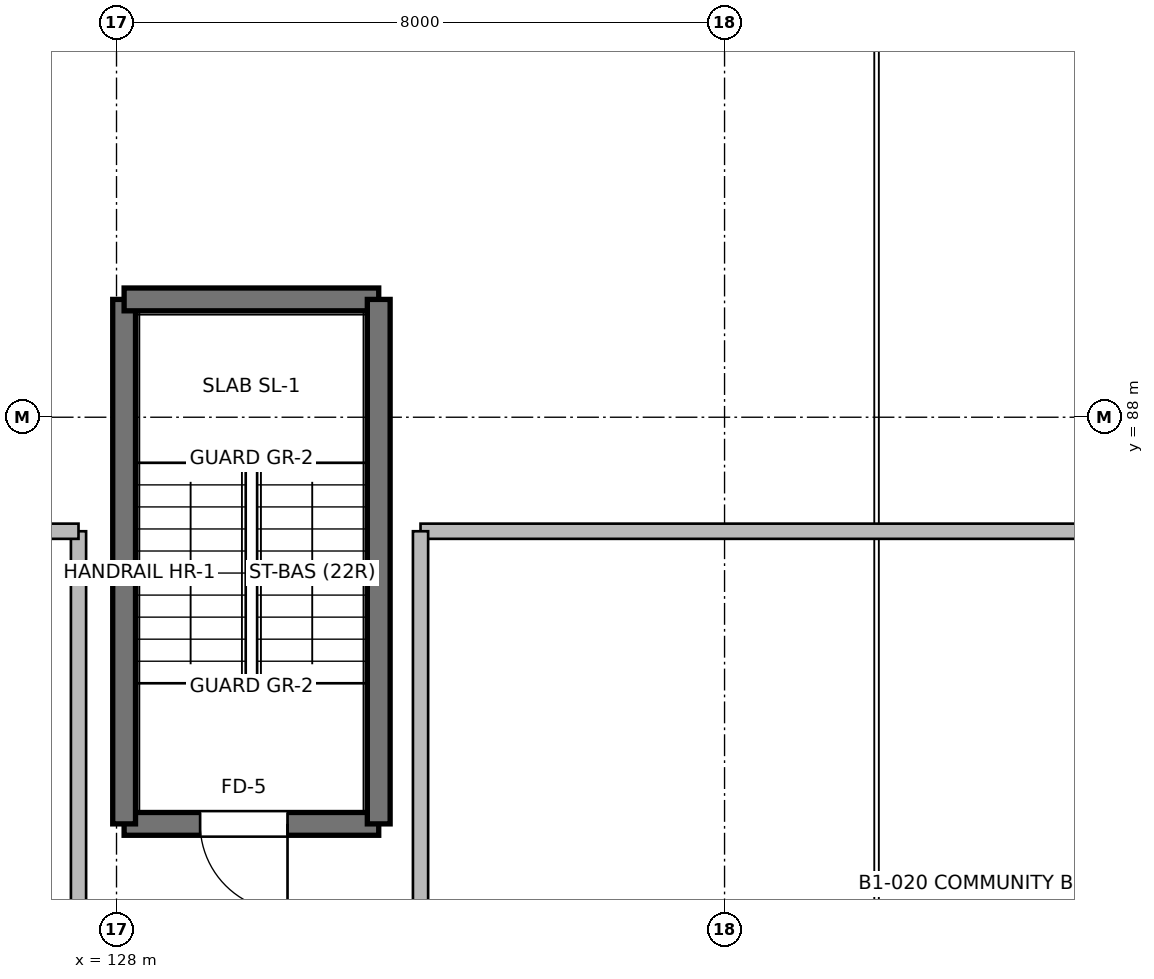
"""IFC4 building model, lengths in metres.
Left out: names, types, materials, properties, quantities, classifications, styles, units other than length and angle.
Written with IfcOpenShell. Run it as: python <this file> out.ifc"""

import sys

from ifc_helpers import new_model, si_unit, direction, frame, frame_2d, origin, place, context, subcontext, project, spatial, rectangle, extrude, element, fill, save


model = new_model("IFC4")
c1 = context("Model", 3, precision=1e-05, world=origin(), true_north=direction((0.0, 1.0)))
c2 = subcontext(c1, "Body", "Model", "MODEL_VIEW")
j1 = project(units=[si_unit("LENGTHUNIT", "METRE"), si_unit("PLANEANGLEUNIT", "RADIAN")], contexts=[c1])
p1 = place(None, origin())
s1 = spatial("IfcSite", under=j1, at=p1, CompositionType="ELEMENT")
p2 = place(p1, origin())
s2 = spatial("IfcBuilding", under=s1, at=p2, CompositionType="ELEMENT")
p3 = place(p2, frame((0.0, 0.0, -3.84)))
s3 = spatial("IfcBuildingStorey", under=s2, at=p3, CompositionType="ELEMENT", Elevation=-3.84)
p4 = place(p3, frame((131.45, 82.65, 0.0), z_axis=(0.0, 0.0, 1.0), x_axis=(-1.0, 0.0, 0.0)))
e1 = element("IfcWall", 1, at=p4, inside=s3, PredefinedType="SHEAR", context=c2, shape_type="SweptSolid", body=[
    extrude(rectangle(XDim=3.35, YDim=0.3, at=frame_2d((1.675, 0.0))), origin(), (0.0, 0.0, 1.0), 3.52),
])
p5 = place(p4, frame((1.2, 0.0, 0.0)))
e2 = element("IfcOpeningElement", 2, at=p5, cuts=e1, PredefinedType="OPENING", context=c2, shape_type="SweptSolid", body=[
    extrude(rectangle(XDim=1.15, YDim=2.2, at=frame_2d((0.575, 1.1))), frame((0.0, 0.16, 0.0), z_axis=(0.0, -1.0, 0.0), x_axis=(1.0, 0.0, 0.0)), (0.0, 0.0, 1.0), 0.32),
])
p6 = place(p3, frame((128.1, 82.65, 0.0), z_axis=(0.0, 0.0, 1.0), x_axis=(0.0, 1.0, 0.0)))
e3 = element("IfcWall", 3, at=p6, inside=s3, PredefinedType="SHEAR", context=c2, shape_type="SweptSolid", body=[
    extrude(rectangle(XDim=6.9, YDim=0.3, at=frame_2d((3.45, 0.0))), origin(), (0.0, 0.0, 1.0), 3.52),
])
p7 = place(p3, frame((128.1, 89.55, 0.0), z_axis=(0.0, 0.0, 1.0), x_axis=(1.0, 0.0, 0.0)))
e4 = element("IfcWall", 4, at=p7, inside=s3, PredefinedType="SHEAR", context=c2, shape_type="SweptSolid", body=[
    extrude(rectangle(XDim=3.35, YDim=0.3, at=frame_2d((1.675, 0.0))), origin(), (0.0, 0.0, 1.0), 3.52),
])
p8 = place(p3, frame((131.45, 89.55, 0.0), z_axis=(0.0, 0.0, 1.0), x_axis=(0.0, -1.0, 0.0)))
e5 = element("IfcWall", 5, at=p8, inside=s3, PredefinedType="SHEAR", context=c2, shape_type="SweptSolid", body=[
    extrude(rectangle(XDim=6.9, YDim=0.3, at=frame_2d((3.45, 0.0))), origin(), (0.0, 0.0, 1.0), 3.52),
])
p9 = place(p3, frame((127.5, 77.2, 0.0), z_axis=(0.0, 0.0, 1.0), x_axis=(0.0, 1.0, 0.0)))
e6 = element("IfcWall", 6, at=p9, inside=s3, PredefinedType="SOLIDWALL", context=c2, shape_type="SweptSolid", body=[
    extrude(rectangle(XDim=9.3, YDim=0.2, at=frame_2d((4.65, 0.0))), origin(), (0.0, 0.0, 1.0), 3.52),
])
p10 = place(p3, frame((127.5, 86.5, 0.0), z_axis=(0.0, 0.0, 1.0), x_axis=(-1.0, 0.0, 0.0)))
e7 = element("IfcWall", 7, at=p10, inside=s3, PredefinedType="SOLIDWALL", context=c2, shape_type="SweptSolid", body=[
    extrude(rectangle(XDim=16.2, YDim=0.2, at=frame_2d((8.1, 0.0))), origin(), (0.0, 0.0, 1.0), 3.52),
])
p11 = place(p10, frame((8.8, 0.0, 0.0)))
e8 = element("IfcOpeningElement", 8, at=p11, cuts=e7, PredefinedType="OPENING", context=c2, shape_type="SweptSolid", body=[
    extrude(rectangle(XDim=1.0, YDim=2.1, at=frame_2d((0.5, 1.05))), frame((0.0, 0.11, 0.0), z_axis=(0.0, -1.0, 0.0), x_axis=(1.0, 0.0, 0.0)), (0.0, 0.0, 1.0), 0.22),
])
p12 = place(p3, frame((151.5, 86.5, 0.0), z_axis=(0.0, 0.0, 1.0), x_axis=(-1.0, 0.0, 0.0)))
e9 = element("IfcWall", 9, at=p12, inside=s3, PredefinedType="SOLIDWALL", context=c2, shape_type="SweptSolid", body=[
    extrude(rectangle(XDim=19.5, YDim=0.2, at=frame_2d((9.75, 0.0))), origin(), (0.0, 0.0, 1.0), 3.52),
])
p13 = place(p12, frame((9.25, 0.0, 0.0)))
e10 = element("IfcOpeningElement", 10, at=p13, cuts=e9, PredefinedType="OPENING", context=c2, shape_type="SweptSolid", body=[
    extrude(rectangle(XDim=1.0, YDim=2.1, at=frame_2d((0.5, 1.05))), frame((0.0, 0.11, 0.0), z_axis=(0.0, -1.0, 0.0), x_axis=(1.0, 0.0, 0.0)), (0.0, 0.0, 1.0), 0.22),
])
p14 = place(p3, frame((132.0, 86.5, 0.0), z_axis=(0.0, 0.0, 1.0), x_axis=(0.0, -1.0, 0.0)))
e11 = element("IfcWall", 11, at=p14, inside=s3, PredefinedType="SOLIDWALL", context=c2, shape_type="SweptSolid", body=[
    extrude(rectangle(XDim=9.3, YDim=0.2, at=frame_2d((4.65, 0.0))), origin(), (0.0, 0.0, 1.0), 3.52),
])
p15 = place(p5, origin())
e12 = element("IfcDoor", 12, at=p15, inside=s3, OperationType="SINGLE_SWING_LEFT", PredefinedType="DOOR", context=c2, shape_type="SweptSolid", body=[
    extrude(rectangle(XDim=1.15, YDim=2.2, at=frame_2d((0.575, 1.1))), frame((0.0, 0.025, 0.0), z_axis=(0.0, -1.0, 0.0), x_axis=(1.0, 0.0, 0.0)), (0.0, 0.0, 1.0), 0.05),
])
fill(e2, e12)
save(model, sys.argv[1])
